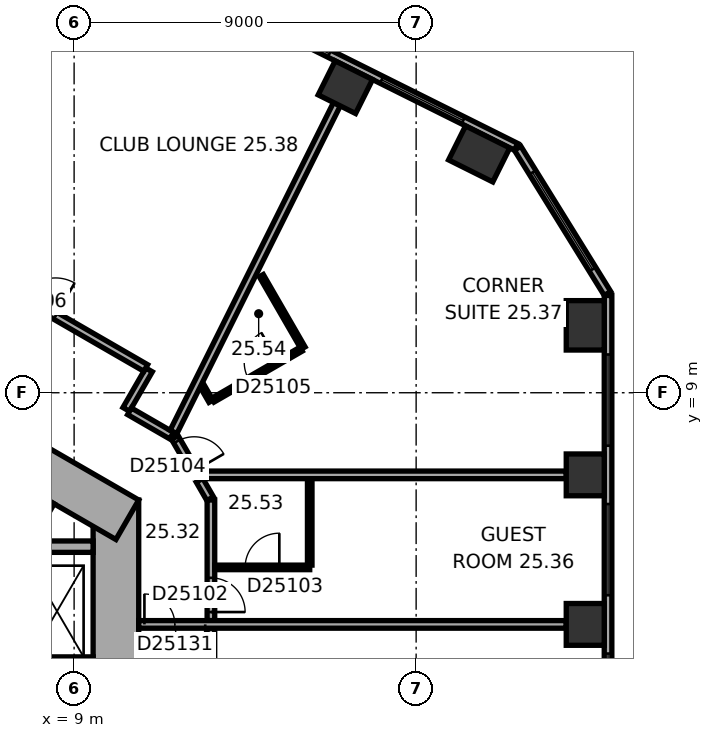
"""IFC4 building model, lengths in metres.
Left out: names, types, materials, properties, quantities, classifications, styles, units other than length and angle.
Written with IfcOpenShell. Run it as: python <this file> out.ifc"""

import sys

from ifc_helpers import new_model, si_unit, direction, frame, frame_2d, origin, origin_2d, place, context, subcontext, project, spatial, rectangle, extrude, element, fill, save


model = new_model("IFC4")
c1 = context("Model", 3, precision=1e-05, world=origin(), true_north=direction((0.0, 1.0)))
c2 = subcontext(c1, "Body", "Model", "MODEL_VIEW")
j1 = project(units=[si_unit("LENGTHUNIT", "METRE"), si_unit("PLANEANGLEUNIT", "RADIAN")], contexts=[c1])
p1 = place(None, origin())
s1 = spatial("IfcSite", under=j1, at=p1, CompositionType="ELEMENT")
p2 = place(p1, origin())
s2 = spatial("IfcBuilding", under=s1, at=p2, CompositionType="ELEMENT")
p3 = place(p2, frame((0.0, 0.0, 106.7)))
s3 = spatial("IfcBuildingStorey", under=s2, at=p3, CompositionType="ELEMENT", Elevation=106.7)
for number, where, z_axis, x_axis in (
    (1, (22.45, 2.905, 0.0), (0.0, 0.0, 1.0), (0.0, 1.0, 0.0)),
    (2, (22.45, 6.839, 0.0), (0.0, 0.0, 1.0), (0.0, 1.0, 0.0)),
):
    element("IfcColumn", number, at=place(p3, frame(where, z_axis=z_axis, x_axis=x_axis)), inside=s3, PredefinedType="COLUMN", context=c2, shape_type="SweptSolid", body=[
        extrude(rectangle(XDim=1.1, YDim=1.0, at=origin_2d()), origin(), (0.0, 0.0, 1.0), 3.3),
    ])
for number, where, z_axis, x_axis in (
    (3, (22.45, 10.774, 0.0), (0.0, 0.0, 1.0), (0.0, 1.0, 0.0)),
    (4, (19.659, 15.284, 0.0), (0.0, 0.0, 1.0), (-0.895, 0.446, 0.0)),
):
    element("IfcColumn", number, at=place(p3, frame(where, z_axis=z_axis, x_axis=x_axis)), inside=s3, PredefinedType="COLUMN", context=c2, shape_type="SweptSolid", body=[
        extrude(rectangle(XDim=1.3, YDim=1.0, at=origin_2d()), origin(), (0.0, 0.0, 1.0), 3.3),
    ])
p4 = place(p3, frame((16.138, 17.04, 0.0), z_axis=(0.0, 0.0, 1.0), x_axis=(-0.894934361602, 0.44619781311, 0.0)))
e5 = element("IfcColumn", 5, at=p4, inside=s3, PredefinedType="COLUMN", context=c2, shape_type="SweptSolid", body=[
    extrude(rectangle(XDim=1.1, YDim=1.0, at=origin_2d()), origin(), (0.0, 0.0, 1.0), 3.3),
])
p5 = place(p3, frame((10.1, -6.177, 0.0), z_axis=(0.0, 0.0, 1.0), x_axis=(0.0, 1.0, 0.0)))
e6 = element("IfcWall", 6, at=p5, inside=s3, PredefinedType="SHEAR", context=c2, shape_type="SweptSolid", body=[
    extrude(rectangle(XDim=12.355, YDim=1.2, at=frame_2d((6.177, 0.0))), origin(), (0.0, 0.0, 1.0), 3.3),
])
p6 = place(p5, frame((6.378, 0.0, 0.0)))
e7 = element("IfcOpeningElement", 7, at=p6, cuts=e6, PredefinedType="OPENING", context=c2, shape_type="SweptSolid", body=[
    extrude(rectangle(XDim=1.5, YDim=2.1, at=frame_2d((0.75, 1.05))), frame((0.0, 0.61, 0.0), z_axis=(0.0, -1.0, 0.0), x_axis=(1.0, 0.0, 0.0)), (0.0, 0.0, 1.0), 1.22),
])
p7 = place(p5, frame((1.828, 0.0, 0.0)))
e8 = element("IfcOpeningElement", 8, at=p7, cuts=e6, PredefinedType="OPENING", context=c2, shape_type="SweptSolid", body=[
    extrude(rectangle(XDim=1.1, YDim=2.1, at=frame_2d((0.55, 1.05))), frame((0.0, 0.61, 0.0), z_axis=(0.0, -1.0, 0.0), x_axis=(1.0, 0.0, 0.0)), (0.0, 0.0, 1.0), 1.22),
])
p8 = place(p5, frame((4.427, 0.0, 0.0)))
e9 = element("IfcOpeningElement", 9, at=p8, cuts=e6, PredefinedType="OPENING", context=c2, shape_type="SweptSolid", body=[
    extrude(rectangle(XDim=1.1, YDim=2.1, at=frame_2d((0.55, 1.05))), frame((0.0, 0.61, 0.0), z_axis=(0.0, -1.0, 0.0), x_axis=(1.0, 0.0, 0.0)), (0.0, 0.0, 1.0), 1.22),
])
p9 = place(p3, frame((10.4, 5.658, 0.0), z_axis=(0.0, 0.0, 1.0), x_axis=(-0.866021384402, 0.500006961711, 0.0)))
e10 = element("IfcWall", 10, at=p9, inside=s3, PredefinedType="SHEAR", context=c2, shape_type="SweptSolid", body=[
    extrude(rectangle(XDim=12.355, YDim=1.2, at=frame_2d((6.178, 0.0))), origin(), (0.0, 0.0, 1.0), 3.3),
])
p10 = place(p9, frame((2.728, 0.0, 0.0)))
e11 = element("IfcOpeningElement", 11, at=p10, cuts=e10, PredefinedType="OPENING", context=c2, shape_type="SweptSolid", body=[
    extrude(rectangle(XDim=1.1, YDim=2.1, at=frame_2d((0.55, 1.05))), frame((0.0, 0.61, 0.0), z_axis=(0.0, -1.0, 0.0), x_axis=(1.0, 0.0, 0.0)), (0.0, 0.0, 1.0), 1.22),
])
p11 = place(p9, frame((5.328, 0.0, 0.0)))
e12 = element("IfcOpeningElement", 12, at=p11, cuts=e10, PredefinedType="OPENING", context=c2, shape_type="SweptSolid", body=[
    extrude(rectangle(XDim=1.1, YDim=2.1, at=frame_2d((0.55, 1.05))), frame((0.0, 0.61, 0.0), z_axis=(0.0, -1.0, 0.0), x_axis=(1.0, 0.0, 0.0)), (0.0, 0.0, 1.0), 1.22),
])
p12 = place(p9, frame((7.928, 0.0, 0.0)))
e13 = element("IfcOpeningElement", 13, at=p12, cuts=e10, PredefinedType="OPENING", context=c2, shape_type="SweptSolid", body=[
    extrude(rectangle(XDim=1.1, YDim=2.1, at=frame_2d((0.55, 1.05))), frame((0.0, 0.61, 0.0), z_axis=(0.0, -1.0, 0.0), x_axis=(1.0, 0.0, 0.0)), (0.0, 0.0, 1.0), 1.22),
])
p13 = place(p3, frame((23.05, -9.687, 0.0), z_axis=(0.0, 0.0, 1.0), x_axis=(0.0, 1.0, 0.0)))
e14 = element("IfcWall", 14, at=p13, inside=s3, PredefinedType="STANDARD", context=c2, shape_type="SweptSolid", body=[
    extrude(rectangle(XDim=21.246, YDim=0.2, at=frame_2d((10.623, 0.0))), origin(), (0.0, 0.0, 1.0), 3.3),
])
p14 = place(p13, frame((1.555, 0.0, 0.8)))
e15 = element("IfcOpeningElement", 15, at=p14, cuts=e14, PredefinedType="OPENING", context=c2, shape_type="SweptSolid", body=[
    extrude(rectangle(XDim=2.4, YDim=1.7, at=frame_2d((1.2, 0.85))), frame((0.0, 0.11, 0.0), z_axis=(0.0, -1.0, 0.0), x_axis=(1.0, 0.0, 0.0)), (0.0, 0.0, 1.0), 0.22),
])
p15 = place(p13, frame((5.489, 0.0, 0.8)))
e16 = element("IfcOpeningElement", 16, at=p15, cuts=e14, PredefinedType="OPENING", context=c2, shape_type="SweptSolid", body=[
    extrude(rectangle(XDim=2.4, YDim=1.7, at=frame_2d((1.2, 0.85))), frame((0.0, 0.11, 0.0), z_axis=(0.0, -1.0, 0.0), x_axis=(1.0, 0.0, 0.0)), (0.0, 0.0, 1.0), 0.22),
])
p16 = place(p13, frame((9.424, 0.0, 0.8)))
e17 = element("IfcOpeningElement", 17, at=p16, cuts=e14, PredefinedType="OPENING", context=c2, shape_type="SweptSolid", body=[
    extrude(rectangle(XDim=2.4, YDim=1.7, at=frame_2d((1.2, 0.85))), frame((0.0, 0.11, 0.0), z_axis=(0.0, -1.0, 0.0), x_axis=(1.0, 0.0, 0.0)), (0.0, 0.0, 1.0), 0.22),
])
p17 = place(p13, frame((13.358, 0.0, 0.8)))
e18 = element("IfcOpeningElement", 18, at=p17, cuts=e14, PredefinedType="OPENING", context=c2, shape_type="SweptSolid", body=[
    extrude(rectangle(XDim=2.4, YDim=1.7, at=frame_2d((1.2, 0.85))), frame((0.0, 0.11, 0.0), z_axis=(0.0, -1.0, 0.0), x_axis=(1.0, 0.0, 0.0)), (0.0, 0.0, 1.0), 0.22),
])
p18 = place(p13, frame((17.293, 0.0, 0.8)))
e19 = element("IfcOpeningElement", 19, at=p18, cuts=e14, PredefinedType="OPENING", context=c2, shape_type="SweptSolid", body=[
    extrude(rectangle(XDim=2.4, YDim=1.7, at=frame_2d((1.2, 0.85))), frame((0.0, 0.11, 0.0), z_axis=(0.0, -1.0, 0.0), x_axis=(1.0, 0.0, 0.0)), (0.0, 0.0, 1.0), 0.22),
])
p19 = place(p3, frame((23.035, 11.612, 0.0), z_axis=(0.0, 0.0, 1.0), x_axis=(-0.526160091227, 0.850385535155, 0.0)))
e20 = element("IfcWall", 20, at=p19, inside=s3, PredefinedType="STANDARD", context=c2, shape_type="SweptSolid", body=[
    extrude(rectangle(XDim=4.494, YDim=0.2, at=frame_2d((2.247, 0.0))), origin(), (0.0, 0.0, 1.0), 3.3),
])
p20 = place(p19, frame((0.747, 0.0, 0.8)))
e21 = element("IfcOpeningElement", 21, at=p20, cuts=e20, PredefinedType="OPENING", context=c2, shape_type="SweptSolid", body=[
    extrude(rectangle(XDim=3.0, YDim=1.7, at=frame_2d((1.5, 0.85))), frame((0.0, 0.11, 0.0), z_axis=(0.0, -1.0, 0.0), x_axis=(1.0, 0.0, 0.0)), (0.0, 0.0, 1.0), 0.22),
])
p21 = place(p3, frame((20.63, 15.47, 0.0), z_axis=(0.0, 0.0, 1.0), x_axis=(-0.894934518609, 0.446197498203, 0.0)))
e22 = element("IfcWall", 22, at=p21, inside=s3, PredefinedType="STANDARD", context=c2, shape_type="SweptSolid", body=[
    extrude(rectangle(XDim=21.246, YDim=0.2, at=frame_2d((10.623, 0.0))), origin(), (0.0, 0.0, 1.0), 3.3),
])
p22 = place(p21, frame((1.553, 0.0, 0.8)))
e23 = element("IfcOpeningElement", 23, at=p22, cuts=e22, PredefinedType="OPENING", context=c2, shape_type="SweptSolid", body=[
    extrude(rectangle(XDim=2.4, YDim=1.7, at=frame_2d((1.2, 0.85))), frame((0.0, 0.11, 0.0), z_axis=(0.0, -1.0, 0.0), x_axis=(1.0, 0.0, 0.0)), (0.0, 0.0, 1.0), 0.22),
])
p23 = place(p21, frame((5.488, 0.0, 0.8)))
e24 = element("IfcOpeningElement", 24, at=p23, cuts=e22, PredefinedType="OPENING", context=c2, shape_type="SweptSolid", body=[
    extrude(rectangle(XDim=2.4, YDim=1.7, at=frame_2d((1.2, 0.85))), frame((0.0, 0.11, 0.0), z_axis=(0.0, -1.0, 0.0), x_axis=(1.0, 0.0, 0.0)), (0.0, 0.0, 1.0), 0.22),
])
p24 = place(p21, frame((9.422, 0.0, 0.8)))
e25 = element("IfcOpeningElement", 25, at=p24, cuts=e22, PredefinedType="OPENING", context=c2, shape_type="SweptSolid", body=[
    extrude(rectangle(XDim=2.4, YDim=1.7, at=frame_2d((1.2, 0.85))), frame((0.0, 0.11, 0.0), z_axis=(0.0, -1.0, 0.0), x_axis=(1.0, 0.0, 0.0)), (0.0, 0.0, 1.0), 0.22),
])
p25 = place(p21, frame((13.357, 0.0, 0.8)))
e26 = element("IfcOpeningElement", 26, at=p25, cuts=e22, PredefinedType="OPENING", context=c2, shape_type="SweptSolid", body=[
    extrude(rectangle(XDim=2.4, YDim=1.7, at=frame_2d((1.2, 0.85))), frame((0.0, 0.11, 0.0), z_axis=(0.0, -1.0, 0.0), x_axis=(1.0, 0.0, 0.0)), (0.0, 0.0, 1.0), 0.22),
])
p26 = place(p21, frame((17.292, 0.0, 0.8)))
e27 = element("IfcOpeningElement", 27, at=p26, cuts=e22, PredefinedType="OPENING", context=c2, shape_type="SweptSolid", body=[
    extrude(rectangle(XDim=2.4, YDim=1.7, at=frame_2d((1.2, 0.85))), frame((0.0, 0.11, 0.0), z_axis=(0.0, -1.0, 0.0), x_axis=(1.0, 0.0, 0.0)), (0.0, 0.0, 1.0), 0.22),
])
p27 = place(p3, frame((7.287, 4.222, 0.0), z_axis=(0.0, 0.0, 1.0), x_axis=(0.499946605688, 0.86605622881, 0.0)))
e28 = element("IfcWall", 28, at=p27, inside=s3, PredefinedType="PARTITIONING", context=c2, shape_type="SweptSolid", body=[
    extrude(rectangle(XDim=2.2, YDim=0.2, at=frame_2d((1.1, 0.0))), origin(), (0.0, 0.0, 1.0), 3.05),
])
p28 = place(p3, frame((7.3, 1.9, 0.0), z_axis=(0.0, 0.0, 1.0), x_axis=(1.0, 0.0, 0.0)))
e29 = element("IfcWall", 29, at=p28, inside=s3, PredefinedType="SHEAR", context=c2, shape_type="SweptSolid", body=[
    extrude(rectangle(XDim=2.2, YDim=0.3, at=frame_2d((1.1, 0.0))), origin(), (0.0, 0.0, 1.0), 3.05),
])
p29 = place(p28, frame((0.7, 0.0, 0.0)))
e30 = element("IfcOpeningElement", 30, at=p29, cuts=e29, PredefinedType="OPENING", context=c2, shape_type="SweptSolid", body=[
    extrude(rectangle(XDim=1.1, YDim=2.1, at=frame_2d((0.55, 1.05))), frame((0.0, 0.16, 0.0), z_axis=(0.0, -1.0, 0.0), x_axis=(1.0, 0.0, 0.0)), (0.0, 0.0, 1.0), 0.32),
])
p30 = place(p3, frame((7.3, 4.95, 0.0), z_axis=(0.0, 0.0, 1.0), x_axis=(1.0, 0.0, 0.0)))
e31 = element("IfcWall", 31, at=p30, inside=s3, PredefinedType="SHEAR", context=c2, shape_type="SweptSolid", body=[
    extrude(rectangle(XDim=2.2, YDim=0.3, at=frame_2d((1.1, 0.0))), origin(), (0.0, 0.0, 1.0), 3.05),
])
p31 = place(p3, frame((8.872, 20.104, 0.0), z_axis=(0.0, 0.0, 1.0), x_axis=(-0.446218378653, -0.894924107706, 0.0)))
e32 = element("IfcWall", 32, at=p31, inside=s3, PredefinedType="PARTITIONING", context=c2, shape_type="SweptSolid", body=[
    extrude(rectangle(XDim=7.95, YDim=0.2, at=frame_2d((3.975, 0.0))), origin(), (0.0, 0.0, 1.0), 3.05),
])
p32 = place(p3, frame((10.371, 8.561, 0.0), z_axis=(0.0, 0.0, 1.0), x_axis=(0.499986357472, 0.866033280158, 0.0)))
e33 = element("IfcWall", 33, at=p32, inside=s3, PredefinedType="PARTITIONING", context=c2, shape_type="SweptSolid", body=[
    extrude(rectangle(XDim=1.201, YDim=0.2, at=frame_2d((0.601, 0.0))), origin(), (0.0, 0.0, 1.0), 3.05),
])
p33 = place(p3, frame((10.885, 9.652, 0.0), z_axis=(0.0, 0.0, 1.0), x_axis=(-0.866033868542, 0.499985338323, 0.0)))
e34 = element("IfcWall", 34, at=p33, inside=s3, PredefinedType="PARTITIONING", context=c2, shape_type="SweptSolid", body=[
    extrude(rectangle(XDim=8.602, YDim=0.2, at=frame_2d((4.301, 0.0))), origin(), (0.0, 0.0, 1.0), 3.05),
])
p34 = place(p33, frame((2.739, 0.0, 0.0)))
e35 = element("IfcOpeningElement", 35, at=p34, cuts=e34, PredefinedType="OPENING", context=c2, shape_type="SweptSolid", body=[
    extrude(rectangle(XDim=1.0, YDim=2.1, at=frame_2d((0.5, 1.05))), frame((0.0, 0.11, 0.0), z_axis=(0.0, -1.0, 0.0), x_axis=(1.0, 0.0, 0.0)), (0.0, 0.0, 1.0), 0.22),
])
p35 = place(p3, frame((11.566, 7.871, 0.0), z_axis=(0.0, 0.0, 1.0), x_axis=(-0.866004557827, 0.500036104519, 0.0)))
e36 = element("IfcWall", 36, at=p35, inside=s3, PredefinedType="PARTITIONING", context=c2, shape_type="SweptSolid", body=[
    extrude(rectangle(XDim=1.28, YDim=0.2, at=frame_2d((0.64, 0.0))), origin(), (0.0, 0.0, 1.0), 3.05),
])
p36 = place(p3, frame((12.218, 6.839, 0.0), z_axis=(0.0, 0.0, 1.0), x_axis=(-0.500044870432, 0.865999496279, 0.0)))
e37 = element("IfcWall", 37, at=p36, inside=s3, PredefinedType="PARTITIONING", context=c2, shape_type="SweptSolid", body=[
    extrude(rectangle(XDim=1.136, YDim=0.2, at=frame_2d((0.568, 0.0))), origin(), (0.0, 0.0, 1.0), 3.05),
])
p37 = place(p36, frame((0.118, 0.0, 0.0)))
e38 = element("IfcOpeningElement", 38, at=p37, cuts=e37, PredefinedType="OPENING", context=c2, shape_type="SweptSolid", body=[
    extrude(rectangle(XDim=0.9, YDim=2.1, at=frame_2d((0.45, 1.05))), frame((0.0, 0.11, 0.0), z_axis=(0.0, -1.0, 0.0), x_axis=(1.0, 0.0, 0.0)), (0.0, 0.0, 1.0), 0.22),
])
p38 = place(p3, frame((12.58, 6.212, 0.0), z_axis=(0.0, 0.0, 1.0), x_axis=(-0.499936258447, 0.86606220186, 0.0)))
e39 = element("IfcWall", 39, at=p38, inside=s3, PredefinedType="PARTITIONING", context=c2, shape_type="SweptSolid", body=[
    extrude(rectangle(XDim=0.56, YDim=0.2, at=frame_2d((0.28, 0.0))), origin(), (0.0, 0.0, 1.0), 3.05),
])
p39 = place(p3, frame((12.6, 0.201, 0.0), z_axis=(0.0, 0.0, 1.0), x_axis=(0.0, 1.0, 0.0)))
e40 = element("IfcWall", 40, at=p39, inside=s3, PredefinedType="PARTITIONING", context=c2, shape_type="SweptSolid", body=[
    extrude(rectangle(XDim=2.604, YDim=0.2, at=frame_2d((1.302, 0.0))), origin(), (0.0, 0.0, 1.0), 3.05),
])
p40 = place(p3, frame((12.6, 3.004, 0.0), z_axis=(0.0, 0.0, 1.0), x_axis=(0.0, 1.0, 0.0)))
e41 = element("IfcWall", 41, at=p40, inside=s3, PredefinedType="PARTITIONING", context=c2, shape_type="SweptSolid", body=[
    extrude(rectangle(XDim=3.173, YDim=0.2, at=frame_2d((1.586, 0.0))), origin(), (0.0, 0.0, 1.0), 3.05),
])
p41 = place(p40, frame((0.225, 0.0, 0.0)))
e42 = element("IfcOpeningElement", 42, at=p41, cuts=e41, PredefinedType="OPENING", context=c2, shape_type="SweptSolid", body=[
    extrude(rectangle(XDim=0.9, YDim=2.1, at=frame_2d((0.45, 1.05))), frame((0.0, 0.11, 0.0), z_axis=(0.0, -1.0, 0.0), x_axis=(1.0, 0.0, 0.0)), (0.0, 0.0, 1.0), 0.22),
])
p42 = place(p3, frame((12.601, 8.776, 0.0), z_axis=(0.0, 0.0, 1.0), x_axis=(-0.500166486798, 0.865929261247, 0.0)))
e43 = element("IfcWall", 43, at=p42, inside=s3, PredefinedType="PARTITIONING", context=c2, shape_type="SweptSolid", body=[
    extrude(rectangle(XDim=0.476, YDim=0.12, at=frame_2d((0.238, 0.0))), origin(), (0.0, 0.0, 1.0), 3.05),
])
p43 = place(p3, frame((13.926, 12.081, 0.0), z_axis=(0.0, 0.0, 1.0), x_axis=(0.499994660107, -0.866028486751, 0.0)))
e44 = element("IfcWall", 44, at=p43, inside=s3, PredefinedType="PARTITIONING", context=c2, shape_type="SweptSolid", body=[
    extrude(rectangle(XDim=2.2, YDim=0.12, at=frame_2d((1.1, 0.0))), origin(), (0.0, 0.0, 1.0), 3.05),
])
p44 = place(p3, frame((14.974, 10.146, 0.0), z_axis=(0.0, 0.0, 1.0), x_axis=(-0.86599746015, -0.500048396672, 0.0)))
e45 = element("IfcWall", 45, at=p44, inside=s3, PredefinedType="PARTITIONING", context=c2, shape_type="SweptSolid", body=[
    extrude(rectangle(XDim=2.68, YDim=0.12, at=frame_2d((1.34, 0.0))), origin(), (0.0, 0.0, 1.0), 3.05),
])
p45 = place(p44, frame((0.69, 0.0, 0.0)))
e46 = element("IfcOpeningElement", 46, at=p45, cuts=e45, PredefinedType="OPENING", context=c2, shape_type="SweptSolid", body=[
    extrude(rectangle(XDim=0.9, YDim=2.1, at=frame_2d((0.45, 1.05))), frame((0.0, 0.07, 0.0), z_axis=(0.0, -1.0, 0.0), x_axis=(1.0, 0.0, 0.0)), (0.0, 0.0, 1.0), 0.14),
])
p46 = place(p3, frame((15.2, 4.405, 0.0), z_axis=(0.0, 0.0, 1.0), x_axis=(-1.0, 0.0, 0.0)))
e47 = element("IfcWall", 47, at=p46, inside=s3, PredefinedType="PARTITIONING", context=c2, shape_type="SweptSolid", body=[
    extrude(rectangle(XDim=2.5, YDim=0.12, at=frame_2d((1.25, 0.0))), origin(), (0.0, 0.0, 1.0), 3.05),
])
p47 = place(p46, frame((0.8, 0.0, 0.0)))
e48 = element("IfcOpeningElement", 48, at=p47, cuts=e47, PredefinedType="OPENING", context=c2, shape_type="SweptSolid", body=[
    extrude(rectangle(XDim=0.9, YDim=2.1, at=frame_2d((0.45, 1.05))), frame((0.0, 0.07, 0.0), z_axis=(0.0, -1.0, 0.0), x_axis=(1.0, 0.0, 0.0)), (0.0, 0.0, 1.0), 0.14),
])
p48 = place(p3, frame((15.2, 6.739, 0.0), z_axis=(0.0, 0.0, 1.0), x_axis=(0.0, -1.0, 0.0)))
e49 = element("IfcWall", 49, at=p48, inside=s3, PredefinedType="PARTITIONING", context=c2, shape_type="SweptSolid", body=[
    extrude(rectangle(XDim=2.274, YDim=0.12, at=frame_2d((1.137, 0.0))), origin(), (0.0, 0.0, 1.0), 3.05),
])
p49 = place(p3, frame((15.915, 16.592, 0.0), z_axis=(0.0, 0.0, 1.0), x_axis=(-0.446199736347, -0.894933402709, 0.0)))
e50 = element("IfcWall", 50, at=p49, inside=s3, PredefinedType="PARTITIONING", context=c2, shape_type="SweptSolid", body=[
    extrude(rectangle(XDim=9.635, YDim=0.2, at=frame_2d((4.817, 0.0))), origin(), (0.0, 0.0, 1.0), 3.05),
])
p50 = place(p3, frame((21.95, 2.905, 0.0), z_axis=(0.0, 0.0, 1.0), x_axis=(-1.0, 0.0, 0.0)))
e51 = element("IfcWall", 51, at=p50, inside=s3, PredefinedType="PARTITIONING", context=c2, shape_type="SweptSolid", body=[
    extrude(rectangle(XDim=11.25, YDim=0.2, at=frame_2d((5.625, 0.0))), origin(), (0.0, 0.0, 1.0), 3.05),
])
p51 = place(p50, frame((9.5, 0.0, 0.0)))
e52 = element("IfcOpeningElement", 52, at=p51, cuts=e51, PredefinedType="OPENING", context=c2, shape_type="SweptSolid", body=[
    extrude(rectangle(XDim=1.6, YDim=2.1, at=frame_2d((0.8, 1.05))), frame((0.0, 0.11, 0.0), z_axis=(0.0, -1.0, 0.0), x_axis=(1.0, 0.0, 0.0)), (0.0, 0.0, 1.0), 0.22),
])
p52 = place(p3, frame((21.95, 6.839, 0.0), z_axis=(0.0, 0.0, 1.0), x_axis=(-1.0, 0.0, 0.0)))
e53 = element("IfcWall", 53, at=p52, inside=s3, PredefinedType="PARTITIONING", context=c2, shape_type="SweptSolid", body=[
    extrude(rectangle(XDim=9.65, YDim=0.2, at=frame_2d((4.825, 0.0))), origin(), (0.0, 0.0, 1.0), 3.05),
])
p53 = place(p16, origin())
e54 = element("IfcWindow", 54, at=p53, inside=s3, PartitioningType="SINGLE_PANEL", PredefinedType="WINDOW", context=c2, shape_type="SweptSolid", body=[
    extrude(rectangle(XDim=2.4, YDim=1.7, at=frame_2d((1.2, 0.85))), frame((0.0, 0.03, 0.0), z_axis=(0.0, -1.0, 0.0), x_axis=(1.0, 0.0, 0.0)), (0.0, 0.0, 1.0), 0.06),
])
fill(e17, e54)
p54 = place(p17, origin())
e55 = element("IfcWindow", 55, at=p54, inside=s3, PartitioningType="SINGLE_PANEL", PredefinedType="WINDOW", context=c2, shape_type="SweptSolid", body=[
    extrude(rectangle(XDim=2.4, YDim=1.7, at=frame_2d((1.2, 0.85))), frame((0.0, 0.03, 0.0), z_axis=(0.0, -1.0, 0.0), x_axis=(1.0, 0.0, 0.0)), (0.0, 0.0, 1.0), 0.06),
])
fill(e18, e55)
p55 = place(p18, origin())
e56 = element("IfcWindow", 56, at=p55, inside=s3, PartitioningType="SINGLE_PANEL", PredefinedType="WINDOW", context=c2, shape_type="SweptSolid", body=[
    extrude(rectangle(XDim=2.4, YDim=1.7, at=frame_2d((1.2, 0.85))), frame((0.0, 0.03, 0.0), z_axis=(0.0, -1.0, 0.0), x_axis=(1.0, 0.0, 0.0)), (0.0, 0.0, 1.0), 0.06),
])
fill(e19, e56)
p56 = place(p20, origin())
e57 = element("IfcWindow", 57, at=p56, inside=s3, PartitioningType="SINGLE_PANEL", PredefinedType="WINDOW", context=c2, shape_type="SweptSolid", body=[
    extrude(rectangle(XDim=3.0, YDim=1.7, at=frame_2d((1.5, 0.85))), frame((0.0, 0.03, 0.0), z_axis=(0.0, -1.0, 0.0), x_axis=(1.0, 0.0, 0.0)), (0.0, 0.0, 1.0), 0.06),
])
fill(e21, e57)
p57 = place(p22, origin())
e58 = element("IfcWindow", 58, at=p57, inside=s3, PartitioningType="SINGLE_PANEL", PredefinedType="WINDOW", context=c2, shape_type="SweptSolid", body=[
    extrude(rectangle(XDim=2.4, YDim=1.7, at=frame_2d((1.2, 0.85))), frame((0.0, 0.03, 0.0), z_axis=(0.0, -1.0, 0.0), x_axis=(1.0, 0.0, 0.0)), (0.0, 0.0, 1.0), 0.06),
])
fill(e23, e58)
p58 = place(p23, origin())
e59 = element("IfcWindow", 59, at=p58, inside=s3, PartitioningType="SINGLE_PANEL", PredefinedType="WINDOW", context=c2, shape_type="SweptSolid", body=[
    extrude(rectangle(XDim=2.4, YDim=1.7, at=frame_2d((1.2, 0.85))), frame((0.0, 0.03, 0.0), z_axis=(0.0, -1.0, 0.0), x_axis=(1.0, 0.0, 0.0)), (0.0, 0.0, 1.0), 0.06),
])
fill(e24, e59)
p59 = place(p41, origin())
e60 = element("IfcDoor", 60, at=p59, inside=s3, OperationType="SINGLE_SWING_LEFT", PredefinedType="DOOR", context=c2, shape_type="SweptSolid", body=[
    extrude(rectangle(XDim=0.9, YDim=2.1, at=frame_2d((0.45, 1.05))), frame((0.0, 0.025, 0.0), z_axis=(0.0, -1.0, 0.0), x_axis=(1.0, 0.0, 0.0)), (0.0, 0.0, 1.0), 0.05),
])
fill(e42, e60)
p60 = place(p47, origin())
e61 = element("IfcDoor", 61, at=p60, inside=s3, OperationType="SINGLE_SWING_LEFT", PredefinedType="DOOR", context=c2, shape_type="SweptSolid", body=[
    extrude(rectangle(XDim=0.9, YDim=2.1, at=frame_2d((0.45, 1.05))), frame((0.0, 0.025, 0.0), z_axis=(0.0, -1.0, 0.0), x_axis=(1.0, 0.0, 0.0)), (0.0, 0.0, 1.0), 0.05),
])
fill(e48, e61)
p61 = place(p37, origin())
e62 = element("IfcDoor", 62, at=p61, inside=s3, OperationType="SINGLE_SWING_LEFT", PredefinedType="DOOR", context=c2, shape_type="SweptSolid", body=[
    extrude(rectangle(XDim=0.9, YDim=2.1, at=frame_2d((0.45, 1.05))), frame((0.0, 0.025, 0.0), z_axis=(0.0, -1.0, 0.0), x_axis=(1.0, 0.0, 0.0)), (0.0, 0.0, 1.0), 0.05),
])
fill(e38, e62)
p62 = place(p45, origin())
e63 = element("IfcDoor", 63, at=p62, inside=s3, OperationType="SINGLE_SWING_LEFT", PredefinedType="DOOR", context=c2, shape_type="SweptSolid", body=[
    extrude(rectangle(XDim=0.9, YDim=2.1, at=frame_2d((0.45, 1.05))), frame((0.0, 0.025, 0.0), z_axis=(0.0, -1.0, 0.0), x_axis=(1.0, 0.0, 0.0)), (0.0, 0.0, 1.0), 0.05),
])
fill(e46, e63)
p63 = place(p34, origin())
e64 = element("IfcDoor", 64, at=p63, inside=s3, OperationType="SINGLE_SWING_LEFT", PredefinedType="DOOR", context=c2, shape_type="SweptSolid", body=[
    extrude(rectangle(XDim=1.0, YDim=2.1, at=frame_2d((0.5, 1.05))), frame((0.0, 0.025, 0.0), z_axis=(0.0, -1.0, 0.0), x_axis=(1.0, 0.0, 0.0)), (0.0, 0.0, 1.0), 0.05),
])
fill(e35, e64)
p64 = place(p51, origin())
e65 = element("IfcDoor", 65, at=p64, inside=s3, OperationType="DOUBLE_DOOR_SINGLE_SWING", PredefinedType="DOOR", context=c2, shape_type="SweptSolid", body=[
    extrude(rectangle(XDim=1.6, YDim=2.1, at=frame_2d((0.8, 1.05))), frame((0.0, 0.025, 0.0), z_axis=(0.0, -1.0, 0.0), x_axis=(1.0, 0.0, 0.0)), (0.0, 0.0, 1.0), 0.05),
])
fill(e52, e65)
save(model, sys.argv[1])
